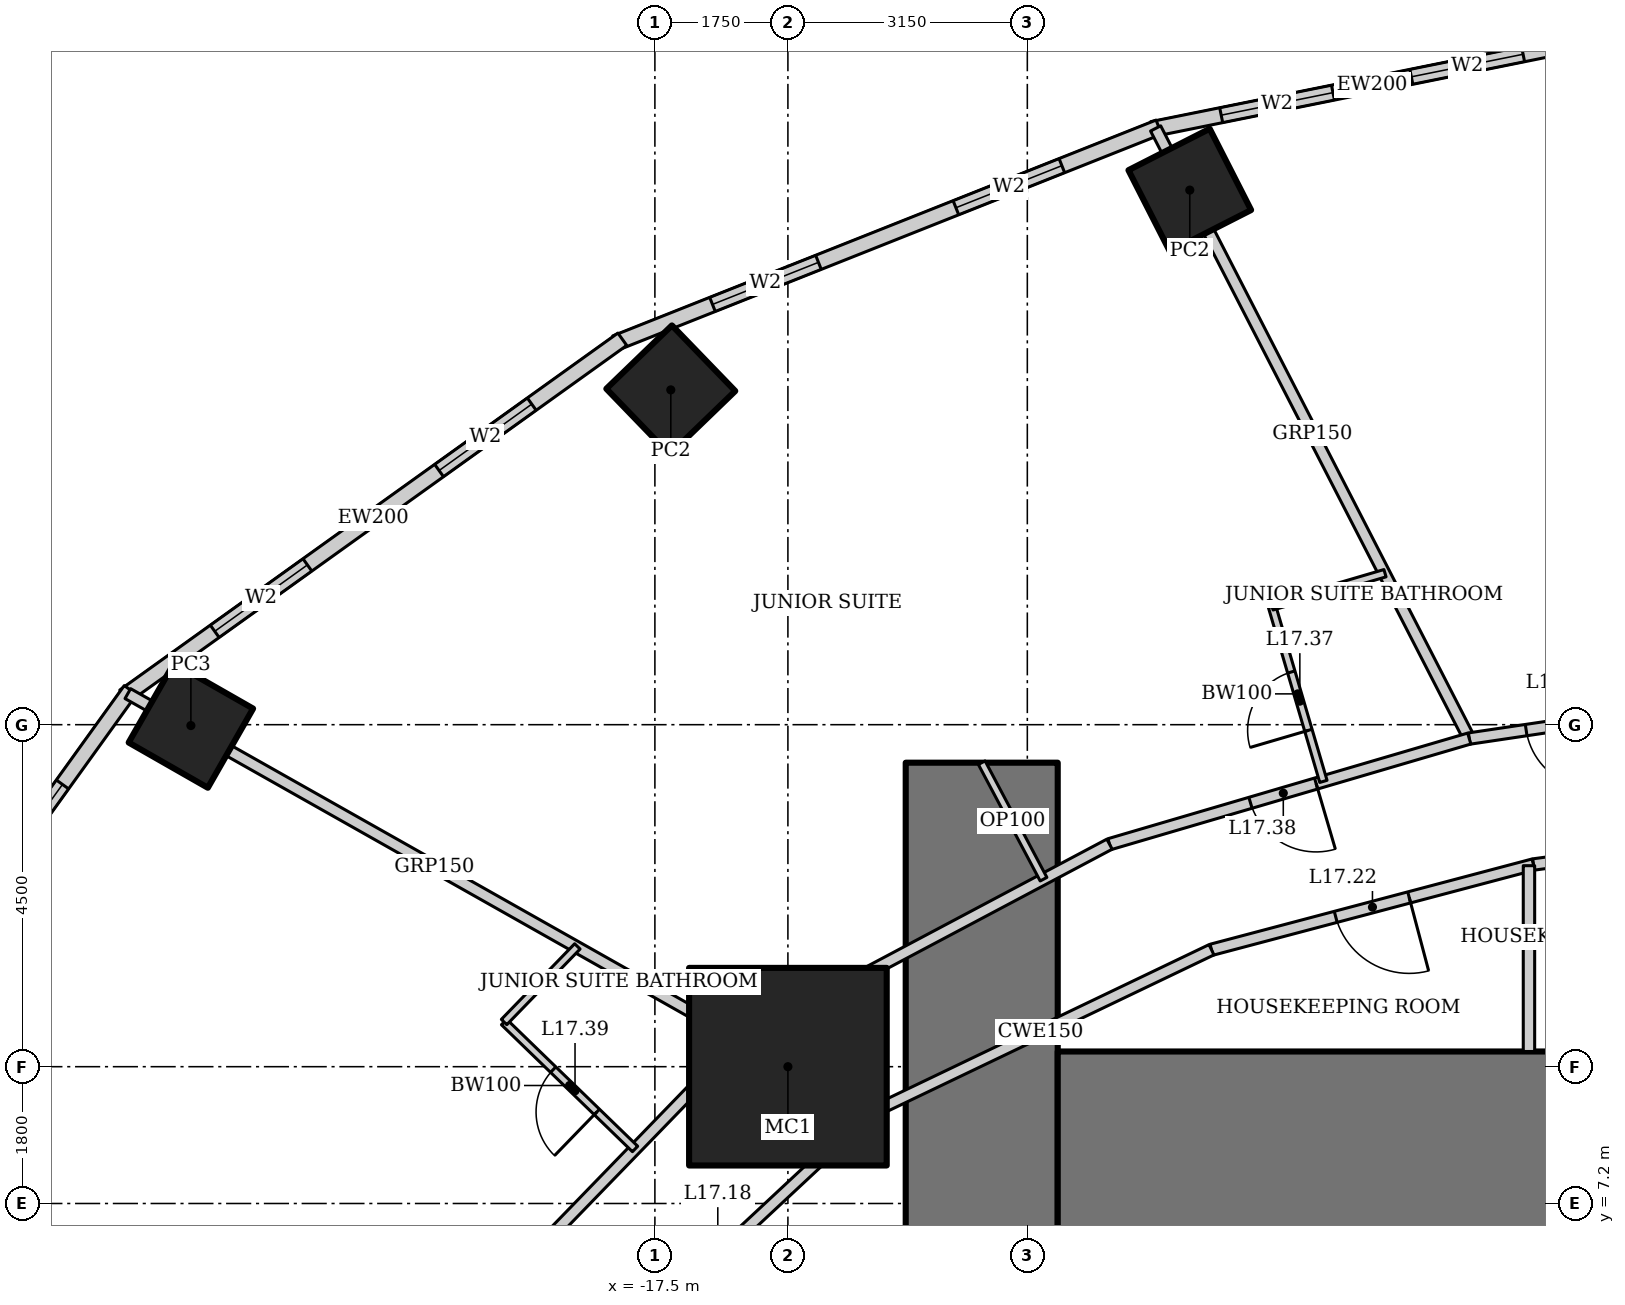
"""IFC4 building model, lengths in metres.
Left out: names, types, materials, properties, quantities, classifications, styles, units other than length and angle.
Written with IfcOpenShell. Run it as: python <this file> out.ifc"""

import sys

from ifc_helpers import new_model, si_unit, direction, frame, frame_2d, origin, origin_2d, place, context, subcontext, project, spatial, rectangle, hollow_rectangle, extrude, element, fill, save


model = new_model("IFC4")
c1 = context("Model", 3, precision=1e-05, world=origin(), true_north=direction((0.0, 1.0)))
c2 = subcontext(c1, "Body", "Model", "MODEL_VIEW")
j1 = project(units=[si_unit("LENGTHUNIT", "METRE"), si_unit("PLANEANGLEUNIT", "RADIAN")], contexts=[c1])
p1 = place(None, origin())
s1 = spatial("IfcSite", under=j1, at=p1, CompositionType="ELEMENT")
p2 = place(p1, origin())
s2 = spatial("IfcBuilding", under=s1, at=p2, CompositionType="ELEMENT")
p3 = place(p2, frame((0.0, 0.0, 76.6)))
s3 = spatial("IfcBuildingStorey", under=s2, at=p3, CompositionType="ELEMENT", Elevation=76.6)
p4 = place(p3, frame((-15.75, 9.0, 0.0), z_axis=(0.0, 0.0, 1.0), x_axis=(1.0, 0.0, 0.0)))
e1 = element("IfcColumn", 1, at=p4, inside=s3, PredefinedType="COLUMN", context=c2, shape_type="SweptSolid", body=[
    extrude(hollow_rectangle(XDim=2.6, YDim=2.6, WallThickness=0.13, at=origin_2d()), origin(), (0.0, 0.0, 1.0), 3.6),
])
for number, where, z_axis, x_axis in (
    (2, (-10.463, 20.534, 0.0), (0.0, 0.0, 1.0), (0.891, 0.454, 0.0)),
    (3, (-17.291, 17.905, 0.0), (0.0, 0.0, 1.0), (0.719, 0.695, 0.0)),
):
    element("IfcColumn", number, at=place(p3, frame(where, z_axis=z_axis, x_axis=x_axis)), inside=s3, PredefinedType="COLUMN", context=c2, shape_type="SweptSolid", body=[
        extrude(hollow_rectangle(XDim=1.2, YDim=1.2, WallThickness=0.1, at=origin_2d()), origin(), (0.0, 0.0, 1.0), 3.6),
    ])
p5 = place(p3, frame((-23.605, 13.489, 0.0), z_axis=(0.0, 0.0, 1.0), x_axis=(0.496139221777, 0.86824298017, 0.0)))
e4 = element("IfcColumn", 4, at=p5, inside=s3, PredefinedType="COLUMN", context=c2, shape_type="SweptSolid", body=[
    extrude(hollow_rectangle(XDim=1.2, YDim=1.2, WallThickness=0.12, at=origin_2d()), origin(), (0.0, 0.0, 1.0), 3.6),
])
p6 = place(p3, frame((-13.2, 13.0, 0.0), z_axis=(0.0, 0.0, 1.0), x_axis=(0.0, -1.0, 0.0)))
e5 = element("IfcWall", 5, at=p6, inside=s3, PredefinedType="SHEAR", context=c2, shape_type="SweptSolid", body=[
    extrude(rectangle(XDim=26.0, YDim=2.0, at=frame_2d((13.0, 0.0))), origin(), (0.0, 0.0, 1.0), 3.6),
])
p7 = place(p6, frame((12.1, 0.0, 0.0)))
e6 = element("IfcOpeningElement", 6, at=p7, cuts=e5, PredefinedType="OPENING", context=c2, shape_type="SweptSolid", body=[
    extrude(rectangle(XDim=1.8, YDim=2.1, at=frame_2d((0.9, 1.05))), frame((0.0, 1.01, 0.0), z_axis=(0.0, -1.0, 0.0), x_axis=(1.0, 0.0, 0.0)), (0.0, 0.0, 1.0), 2.02),
])
p8 = place(p3, frame((12.2, 8.0, 0.0), z_axis=(0.0, 0.0, 1.0), x_axis=(-1.0, 0.0, 0.0)))
e7 = element("IfcWall", 7, at=p8, inside=s3, PredefinedType="SHEAR", context=c2, shape_type="SweptSolid", body=[
    extrude(rectangle(XDim=24.4, YDim=2.4, at=frame_2d((12.2, 0.0))), origin(), (0.0, 0.0, 1.0), 3.6),
])
p9 = place(p3, frame((-5.17, 22.504, 0.0), z_axis=(0.0, 0.0, 1.0), x_axis=(-0.980251657452, -0.197754110105, 0.0)))
e8 = element("IfcWall", 8, at=p9, inside=s3, PredefinedType="SOLIDWALL", context=c2, shape_type="SweptSolid", body=[
    extrude(rectangle(XDim=5.904, YDim=0.2, at=frame_2d((2.952, 0.0))), origin(), (0.0, 0.0, 1.0), 3.45),
])
p10 = place(p9, frame((0.926, 0.0, 0.5)))
e9 = element("IfcOpeningElement", 9, at=p10, cuts=e8, PredefinedType="OPENING", context=c2, shape_type="SweptSolid", body=[
    extrude(rectangle(XDim=1.5, YDim=2.2, at=frame_2d((0.75, 1.1))), frame((0.0, 0.11, 0.0), z_axis=(0.0, -1.0, 0.0), x_axis=(1.0, 0.0, 0.0)), (0.0, 0.0, 1.0), 0.22),
])
p11 = place(p9, frame((3.478, 0.0, 0.5)))
e10 = element("IfcOpeningElement", 10, at=p11, cuts=e8, PredefinedType="OPENING", context=c2, shape_type="SweptSolid", body=[
    extrude(rectangle(XDim=1.5, YDim=2.2, at=frame_2d((0.75, 1.1))), frame((0.0, 0.11, 0.0), z_axis=(0.0, -1.0, 0.0), x_axis=(1.0, 0.0, 0.0)), (0.0, 0.0, 1.0), 0.22),
])
p12 = place(p3, frame((-10.869, 21.363, 0.0), z_axis=(0.0, 0.0, 1.0), x_axis=(-0.929358351251, -0.369178892895, 0.0)))
e11 = element("IfcWall", 11, at=p12, inside=s3, PredefinedType="SOLIDWALL", context=c2, shape_type="SweptSolid", body=[
    extrude(rectangle(XDim=7.692, YDim=0.2, at=frame_2d((3.846, 0.0))), origin(), (0.0, 0.0, 1.0), 3.45),
])
p13 = place(p12, frame((1.373, 0.0, 0.5)))
e12 = element("IfcOpeningElement", 12, at=p13, cuts=e11, PredefinedType="OPENING", context=c2, shape_type="SweptSolid", body=[
    extrude(rectangle(XDim=1.5, YDim=2.2, at=frame_2d((0.75, 1.1))), frame((0.0, 0.11, 0.0), z_axis=(0.0, -1.0, 0.0), x_axis=(1.0, 0.0, 0.0)), (0.0, 0.0, 1.0), 0.22),
])
p14 = place(p12, frame((4.819, 0.0, 0.5)))
e13 = element("IfcOpeningElement", 13, at=p14, cuts=e11, PredefinedType="OPENING", context=c2, shape_type="SweptSolid", body=[
    extrude(rectangle(XDim=1.5, YDim=2.2, at=frame_2d((0.75, 1.1))), frame((0.0, 0.11, 0.0), z_axis=(0.0, -1.0, 0.0), x_axis=(1.0, 0.0, 0.0)), (0.0, 0.0, 1.0), 0.22),
])
p15 = place(p3, frame((-17.929, 18.572, 0.0), z_axis=(0.0, 0.0, 1.0), x_axis=(-0.812791321576, -0.582554948112, 0.0)))
e14 = element("IfcWall", 14, at=p15, inside=s3, PredefinedType="SOLIDWALL", context=c2, shape_type="SweptSolid", body=[
    extrude(rectangle(XDim=8.063, YDim=0.2, at=frame_2d((4.032, 0.0))), origin(), (0.0, 0.0, 1.0), 3.45),
])
p16 = place(p15, frame((1.466, 0.0, 0.5)))
e15 = element("IfcOpeningElement", 15, at=p16, cuts=e14, PredefinedType="OPENING", context=c2, shape_type="SweptSolid", body=[
    extrude(rectangle(XDim=1.5, YDim=2.2, at=frame_2d((0.75, 1.1))), frame((0.0, 0.11, 0.0), z_axis=(0.0, -1.0, 0.0), x_axis=(1.0, 0.0, 0.0)), (0.0, 0.0, 1.0), 0.22),
])
p17 = place(p15, frame((5.097, 0.0, 0.5)))
e16 = element("IfcOpeningElement", 16, at=p17, cuts=e14, PredefinedType="OPENING", context=c2, shape_type="SweptSolid", body=[
    extrude(rectangle(XDim=1.5, YDim=2.2, at=frame_2d((0.75, 1.1))), frame((0.0, 0.11, 0.0), z_axis=(0.0, -1.0, 0.0), x_axis=(1.0, 0.0, 0.0)), (0.0, 0.0, 1.0), 0.22),
])
p18 = place(p3, frame((-24.4, 13.957, 0.0), z_axis=(0.0, 0.0, 1.0), x_axis=(-0.583937613703, -0.811798536155, 0.0)))
e17 = element("IfcWall", 17, at=p18, inside=s3, PredefinedType="SOLIDWALL", context=c2, shape_type="SweptSolid", body=[
    extrude(rectangle(XDim=8.323, YDim=0.2, at=frame_2d((4.162, 0.0))), origin(), (0.0, 0.0, 1.0), 3.45),
])
p19 = place(p18, frame((1.531, 0.0, 0.5)))
e18 = element("IfcOpeningElement", 18, at=p19, cuts=e17, PredefinedType="OPENING", context=c2, shape_type="SweptSolid", body=[
    extrude(rectangle(XDim=1.5, YDim=2.2, at=frame_2d((0.75, 1.1))), frame((0.0, 0.11, 0.0), z_axis=(0.0, -1.0, 0.0), x_axis=(1.0, 0.0, 0.0)), (0.0, 0.0, 1.0), 0.22),
])
p20 = place(p18, frame((5.292, 0.0, 0.5)))
e19 = element("IfcOpeningElement", 19, at=p20, cuts=e17, PredefinedType="OPENING", context=c2, shape_type="SweptSolid", body=[
    extrude(rectangle(XDim=1.5, YDim=2.2, at=frame_2d((0.75, 1.1))), frame((0.0, 0.11, 0.0), z_axis=(0.0, -1.0, 0.0), x_axis=(1.0, 0.0, 0.0)), (0.0, 0.0, 1.0), 0.22),
])
p21 = place(p3, frame((-10.912, 21.346, 0.0), z_axis=(0.0, 0.0, 1.0), x_axis=(0.457117602022, -0.889406261458, 0.0)))
e20 = element("IfcWall", 20, at=p21, inside=s3, PredefinedType="PARTITIONING", context=c2, shape_type="SweptSolid", body=[
    extrude(rectangle(XDim=9.027, YDim=0.15, at=frame_2d((4.513, 0.0))), origin(), (0.0, 0.0, 1.0), 2.528),
])
p22 = place(p3, frame((-24.435, 13.909, 0.0), z_axis=(0.0, 0.0, 1.0), x_axis=(0.870744406136, -0.491735883563, 0.0)))
e21 = element("IfcWall", 21, at=p22, inside=s3, PredefinedType="PARTITIONING", context=c2, shape_type="SweptSolid", body=[
    extrude(rectangle(XDim=9.263, YDim=0.15, at=frame_2d((4.631, 0.0))), origin(), (0.0, 0.0, 1.0), 2.693),
])
p23 = place(p3, frame((-3.198, 13.851, 0.0), z_axis=(0.0, 0.0, 1.0), x_axis=(-0.989107488999, -0.14719502439, 0.0)))
e22 = element("IfcWall", 22, at=p23, inside=s3, PredefinedType="PARTITIONING", context=c2, shape_type="SweptSolid", body=[
    extrude(rectangle(XDim=3.627, YDim=0.15, at=frame_2d((1.814, 0.0))), origin(), (0.0, 0.0, 1.0), 3.45),
])
p24 = place(p23, frame((1.97, 0.0, 0.0)))
e23 = element("IfcOpeningElement", 23, at=p24, cuts=e22, PredefinedType="OPENING", context=c2, shape_type="SweptSolid", body=[
    extrude(rectangle(XDim=0.9, YDim=2.1, at=frame_2d((0.45, 1.05))), frame((0.0, 0.085, 0.0), z_axis=(0.0, -1.0, 0.0), x_axis=(1.0, 0.0, 0.0)), (0.0, 0.0, 1.0), 0.17),
])
p25 = place(p3, frame((-6.786, 13.317, 0.0), z_axis=(0.0, 0.0, 1.0), x_axis=(-0.959496227294, -0.281721475589, 0.0)))
e24 = element("IfcWall", 24, at=p25, inside=s3, PredefinedType="PARTITIONING", context=c2, shape_type="SweptSolid", body=[
    extrude(rectangle(XDim=4.933, YDim=0.15, at=frame_2d((2.466, 0.0))), origin(), (0.0, 0.0, 1.0), 3.45),
])
p26 = place(p25, frame((2.1, 0.0, 0.0)))
e25 = element("IfcOpeningElement", 25, at=p26, cuts=e24, PredefinedType="OPENING", context=c2, shape_type="SweptSolid", body=[
    extrude(rectangle(XDim=0.9, YDim=2.1, at=frame_2d((0.45, 1.05))), frame((0.0, 0.085, 0.0), z_axis=(0.0, -1.0, 0.0), x_axis=(1.0, 0.0, 0.0)), (0.0, 0.0, 1.0), 0.17),
])
p27 = place(p3, frame((-11.519, 11.928, 0.0), z_axis=(0.0, 0.0, 1.0), x_axis=(-0.883334368785, -0.468743419071, 0.0)))
e26 = element("IfcWall", 26, at=p27, inside=s3, PredefinedType="PARTITIONING", context=c2, shape_type="SweptSolid", body=[
    extrude(rectangle(XDim=5.491, YDim=0.15, at=frame_2d((2.746, 0.0))), origin(), (0.0, 0.0, 1.0), 3.45),
])
p28 = place(p3, frame((-16.369, 9.354, 0.0), z_axis=(0.0, 0.0, 1.0), x_axis=(-0.695871090686, -0.71816671125, 0.0)))
e27 = element("IfcWall", 27, at=p28, inside=s3, PredefinedType="PARTITIONING", context=c2, shape_type="SweptSolid", body=[
    extrude(rectangle(XDim=5.913, YDim=0.15, at=frame_2d((2.957, 0.0))), origin(), (0.0, 0.0, 1.0), 3.45),
])
p29 = place(p3, frame((-2.79, 12.083, 0.0), z_axis=(0.0, 0.0, 1.0), x_axis=(-0.991129053928, -0.13290296633, 0.0)))
e28 = element("IfcWall", 28, at=p29, inside=s3, PredefinedType="PARTITIONING", context=c2, shape_type="SweptSolid", body=[
    extrude(rectangle(XDim=3.18, YDim=0.15, at=frame_2d((1.59, 0.0))), origin(), (0.0, 0.0, 1.0), 3.45),
])
p30 = place(p29, frame((0.1, 0.0, 0.0)))
e29 = element("IfcOpeningElement", 29, at=p30, cuts=e28, PredefinedType="OPENING", context=c2, shape_type="SweptSolid", body=[
    extrude(rectangle(XDim=0.9, YDim=2.1, at=frame_2d((0.45, 1.05))), frame((0.0, 0.085, 0.0), z_axis=(0.0, -1.0, 0.0), x_axis=(1.0, 0.0, 0.0)), (0.0, 0.0, 1.0), 0.17),
])
p31 = place(p29, frame((1.422, 0.0, 0.0)))
e30 = element("IfcOpeningElement", 30, at=p31, cuts=e28, PredefinedType="OPENING", context=c2, shape_type="SweptSolid", body=[
    extrude(rectangle(XDim=0.9, YDim=2.1, at=frame_2d((0.45, 1.05))), frame((0.0, 0.085, 0.0), z_axis=(0.0, -1.0, 0.0), x_axis=(1.0, 0.0, 0.0)), (0.0, 0.0, 1.0), 0.17),
])
p32 = place(p3, frame((-5.941, 11.66, 0.0), z_axis=(0.0, 0.0, 1.0), x_axis=(-0.966672790407, -0.256015070428, 0.0)))
e31 = element("IfcWall", 31, at=p32, inside=s3, PredefinedType="PARTITIONING", context=c2, shape_type="SweptSolid", body=[
    extrude(rectangle(XDim=4.382, YDim=0.15, at=frame_2d((2.191, 0.0))), origin(), (0.0, 0.0, 1.0), 3.45),
])
p33 = place(p32, frame((1.691, 0.0, 0.0)))
e32 = element("IfcOpeningElement", 32, at=p33, cuts=e31, PredefinedType="OPENING", context=c2, shape_type="SweptSolid", body=[
    extrude(rectangle(XDim=1.0, YDim=2.1, at=frame_2d((0.5, 1.05))), frame((0.0, 0.085, 0.0), z_axis=(0.0, -1.0, 0.0), x_axis=(1.0, 0.0, 0.0)), (0.0, 0.0, 1.0), 0.17),
])
p34 = place(p3, frame((-10.177, 10.539, 0.0), z_axis=(0.0, 0.0, 1.0), x_axis=(-0.901869692799, -0.43200816799, 0.0)))
e33 = element("IfcWall", 33, at=p34, inside=s3, PredefinedType="PARTITIONING", context=c2, shape_type="SweptSolid", body=[
    extrude(rectangle(XDim=4.986, YDim=0.15, at=frame_2d((2.493, 0.0))), origin(), (0.0, 0.0, 1.0), 3.45),
])
p35 = place(p3, frame((-14.673, 8.385, 0.0), z_axis=(0.0, 0.0, 1.0), x_axis=(-0.731260145007, -0.682098673452, 0.0)))
e34 = element("IfcWall", 34, at=p35, inside=s3, PredefinedType="PARTITIONING", context=c2, shape_type="SweptSolid", body=[
    extrude(rectangle(XDim=5.468, YDim=0.15, at=frame_2d((2.734, 0.0))), origin(), (0.0, 0.0, 1.0), 3.45),
])
p36 = place(p35, frame((2.234, 0.0, 0.0)))
e35 = element("IfcOpeningElement", 35, at=p36, cuts=e34, PredefinedType="OPENING", context=c2, shape_type="SweptSolid", body=[
    extrude(rectangle(XDim=1.0, YDim=2.1, at=frame_2d((0.5, 1.05))), frame((0.0, 0.085, 0.0), z_axis=(0.0, -1.0, 0.0), x_axis=(1.0, 0.0, 0.0)), (0.0, 0.0, 1.0), 0.17),
])
p37 = place(p3, frame((-6.0, 9.2, 0.0), z_axis=(0.0, 0.0, 1.0), x_axis=(0.0, 1.0, 0.0)))
e36 = element("IfcWall", 36, at=p37, inside=s3, PredefinedType="SOLIDWALL", context=c2, shape_type="SweptSolid", body=[
    extrude(rectangle(XDim=2.445, YDim=0.15, at=frame_2d((1.222, 0.0))), origin(), (0.0, 0.0, 1.0), 3.046),
])
p38 = place(p3, frame((-8.705, 12.754, 0.0), z_axis=(0.0, 0.0, 1.0), x_axis=(-0.281659633817, 0.959514382736, 0.0)))
e37 = element("IfcWall", 37, at=p38, inside=s3, PredefinedType="PARTITIONING", context=c2, shape_type="SweptSolid", body=[
    extrude(rectangle(XDim=2.4, YDim=0.1, at=frame_2d((1.2, 0.0))), origin(), (0.0, 0.0, 1.0), 3.45),
])
p39 = place(p38, frame((0.7, 0.0, 0.0)))
e38 = element("IfcOpeningElement", 38, at=p39, cuts=e37, PredefinedType="OPENING", context=c2, shape_type="SweptSolid", body=[
    extrude(rectangle(XDim=0.8, YDim=2.1, at=frame_2d((0.4, 1.05))), frame((0.0, 0.06, 0.0), z_axis=(0.0, -1.0, 0.0), x_axis=(1.0, 0.0, 0.0)), (0.0, 0.0, 1.0), 0.12),
])
p40 = place(p3, frame((-9.381, 15.057, 0.0), z_axis=(0.0, 0.0, 1.0), x_axis=(0.959518451093, 0.281645773999, 0.0)))
e39 = element("IfcWall", 39, at=p40, inside=s3, PredefinedType="PARTITIONING", context=c2, shape_type="SweptSolid", body=[
    extrude(rectangle(XDim=1.549, YDim=0.1, at=frame_2d((0.774, 0.0))), origin(), (0.0, 0.0, 1.0), 3.45),
])
p41 = place(p3, frame((-17.761, 7.917, 0.0), z_axis=(0.0, 0.0, 1.0), x_axis=(-0.718157610206, 0.695880483204, 0.0)))
e40 = element("IfcWall", 40, at=p41, inside=s3, PredefinedType="PARTITIONING", context=c2, shape_type="SweptSolid", body=[
    extrude(rectangle(XDim=2.4, YDim=0.1, at=frame_2d((1.2, 0.0))), origin(), (0.0, 0.0, 1.0), 3.45),
])
p42 = place(p41, frame((0.7, 0.0, 0.0)))
e41 = element("IfcOpeningElement", 41, at=p42, cuts=e40, PredefinedType="OPENING", context=c2, shape_type="SweptSolid", body=[
    extrude(rectangle(XDim=0.8, YDim=2.1, at=frame_2d((0.4, 1.05))), frame((0.0, 0.06, 0.0), z_axis=(0.0, -1.0, 0.0), x_axis=(1.0, 0.0, 0.0)), (0.0, 0.0, 1.0), 0.12),
])
p43 = place(p3, frame((-19.484, 9.588, 0.0), z_axis=(0.0, 0.0, 1.0), x_axis=(0.695920174922, 0.718119147591, 0.0)))
e42 = element("IfcWall", 42, at=p43, inside=s3, PredefinedType="PARTITIONING", context=c2, shape_type="SweptSolid", body=[
    extrude(rectangle(XDim=1.386, YDim=0.1, at=frame_2d((0.693, 0.0))), origin(), (0.0, 0.0, 1.0), 3.45),
])
p44 = place(p3, frame((-13.2, 13.0, 0.0), z_axis=(0.0, 0.0, 1.0), x_axis=(0.46874717052, -0.88333237806, 0.0)))
e43 = element("IfcWall", 43, at=p44, inside=s3, PredefinedType="PARTITIONING", context=c2, shape_type="SweptSolid", body=[
    extrude(rectangle(XDim=1.735, YDim=0.1, at=frame_2d((0.868, 0.0))), origin(), (0.0, 0.0, 1.0), 3.45),
])
p45 = place(p10, origin())
e44 = element("IfcWindow", 44, at=p45, inside=s3, PartitioningType="SINGLE_PANEL", PredefinedType="WINDOW", context=c2, shape_type="SweptSolid", body=[
    extrude(rectangle(XDim=1.5, YDim=2.2, at=frame_2d((0.75, 1.1))), frame((0.0, 0.03, 0.0), z_axis=(0.0, -1.0, 0.0), x_axis=(1.0, 0.0, 0.0)), (0.0, 0.0, 1.0), 0.06),
])
fill(e9, e44)
p46 = place(p11, origin())
e45 = element("IfcWindow", 45, at=p46, inside=s3, PartitioningType="SINGLE_PANEL", PredefinedType="WINDOW", context=c2, shape_type="SweptSolid", body=[
    extrude(rectangle(XDim=1.5, YDim=2.2, at=frame_2d((0.75, 1.1))), frame((0.0, 0.03, 0.0), z_axis=(0.0, -1.0, 0.0), x_axis=(1.0, 0.0, 0.0)), (0.0, 0.0, 1.0), 0.06),
])
fill(e10, e45)
p47 = place(p13, origin())
e46 = element("IfcWindow", 46, at=p47, inside=s3, PartitioningType="SINGLE_PANEL", PredefinedType="WINDOW", context=c2, shape_type="SweptSolid", body=[
    extrude(rectangle(XDim=1.5, YDim=2.2, at=frame_2d((0.75, 1.1))), frame((0.0, 0.03, 0.0), z_axis=(0.0, -1.0, 0.0), x_axis=(1.0, 0.0, 0.0)), (0.0, 0.0, 1.0), 0.06),
])
fill(e12, e46)
p48 = place(p14, origin())
e47 = element("IfcWindow", 47, at=p48, inside=s3, PartitioningType="SINGLE_PANEL", PredefinedType="WINDOW", context=c2, shape_type="SweptSolid", body=[
    extrude(rectangle(XDim=1.5, YDim=2.2, at=frame_2d((0.75, 1.1))), frame((0.0, 0.03, 0.0), z_axis=(0.0, -1.0, 0.0), x_axis=(1.0, 0.0, 0.0)), (0.0, 0.0, 1.0), 0.06),
])
fill(e13, e47)
p49 = place(p16, origin())
e48 = element("IfcWindow", 48, at=p49, inside=s3, PartitioningType="SINGLE_PANEL", PredefinedType="WINDOW", context=c2, shape_type="SweptSolid", body=[
    extrude(rectangle(XDim=1.5, YDim=2.2, at=frame_2d((0.75, 1.1))), frame((0.0, 0.03, 0.0), z_axis=(0.0, -1.0, 0.0), x_axis=(1.0, 0.0, 0.0)), (0.0, 0.0, 1.0), 0.06),
])
fill(e15, e48)
p50 = place(p17, origin())
e49 = element("IfcWindow", 49, at=p50, inside=s3, PartitioningType="SINGLE_PANEL", PredefinedType="WINDOW", context=c2, shape_type="SweptSolid", body=[
    extrude(rectangle(XDim=1.5, YDim=2.2, at=frame_2d((0.75, 1.1))), frame((0.0, 0.03, 0.0), z_axis=(0.0, -1.0, 0.0), x_axis=(1.0, 0.0, 0.0)), (0.0, 0.0, 1.0), 0.06),
])
fill(e16, e49)
p51 = place(p19, origin())
e50 = element("IfcWindow", 50, at=p51, inside=s3, PartitioningType="SINGLE_PANEL", PredefinedType="WINDOW", context=c2, shape_type="SweptSolid", body=[
    extrude(rectangle(XDim=1.5, YDim=2.2, at=frame_2d((0.75, 1.1))), frame((0.0, 0.03, 0.0), z_axis=(0.0, -1.0, 0.0), x_axis=(1.0, 0.0, 0.0)), (0.0, 0.0, 1.0), 0.06),
])
fill(e18, e50)
p52 = place(p33, origin())
e51 = element("IfcDoor", 51, at=p52, inside=s3, OperationType="SINGLE_SWING_LEFT", PredefinedType="DOOR", context=c2, shape_type="SweptSolid", body=[
    extrude(rectangle(XDim=1.0, YDim=2.1, at=frame_2d((0.5, 1.05))), frame((0.0, 0.025, 0.0), z_axis=(0.0, -1.0, 0.0), x_axis=(1.0, 0.0, 0.0)), (0.0, 0.0, 1.0), 0.05),
])
fill(e32, e51)
p53 = place(p24, origin())
e52 = element("IfcDoor", 52, at=p53, inside=s3, OperationType="SINGLE_SWING_LEFT", PredefinedType="DOOR", context=c2, shape_type="SweptSolid", body=[
    extrude(rectangle(XDim=0.9, YDim=2.1, at=frame_2d((0.45, 1.05))), frame((0.0, 0.025, 0.0), z_axis=(0.0, -1.0, 0.0), x_axis=(1.0, 0.0, 0.0)), (0.0, 0.0, 1.0), 0.05),
])
fill(e23, e52)
p54 = place(p39, origin())
e53 = element("IfcDoor", 53, at=p54, inside=s3, OperationType="SINGLE_SWING_LEFT", PredefinedType="DOOR", context=c2, shape_type="SweptSolid", body=[
    extrude(rectangle(XDim=0.8, YDim=2.1, at=frame_2d((0.4, 1.05))), frame((0.0, 0.025, 0.0), z_axis=(0.0, -1.0, 0.0), x_axis=(1.0, 0.0, 0.0)), (0.0, 0.0, 1.0), 0.05),
])
fill(e38, e53)
p55 = place(p26, origin())
e54 = element("IfcDoor", 54, at=p55, inside=s3, OperationType="SINGLE_SWING_LEFT", PredefinedType="DOOR", context=c2, shape_type="SweptSolid", body=[
    extrude(rectangle(XDim=0.9, YDim=2.1, at=frame_2d((0.45, 1.05))), frame((0.0, 0.025, 0.0), z_axis=(0.0, -1.0, 0.0), x_axis=(1.0, 0.0, 0.0)), (0.0, 0.0, 1.0), 0.05),
])
fill(e25, e54)
p56 = place(p42, origin())
e55 = element("IfcDoor", 55, at=p56, inside=s3, OperationType="SINGLE_SWING_LEFT", PredefinedType="DOOR", context=c2, shape_type="SweptSolid", body=[
    extrude(rectangle(XDim=0.8, YDim=2.1, at=frame_2d((0.4, 1.05))), frame((0.0, 0.025, 0.0), z_axis=(0.0, -1.0, 0.0), x_axis=(1.0, 0.0, 0.0)), (0.0, 0.0, 1.0), 0.05),
])
fill(e41, e55)
save(model, sys.argv[1])
